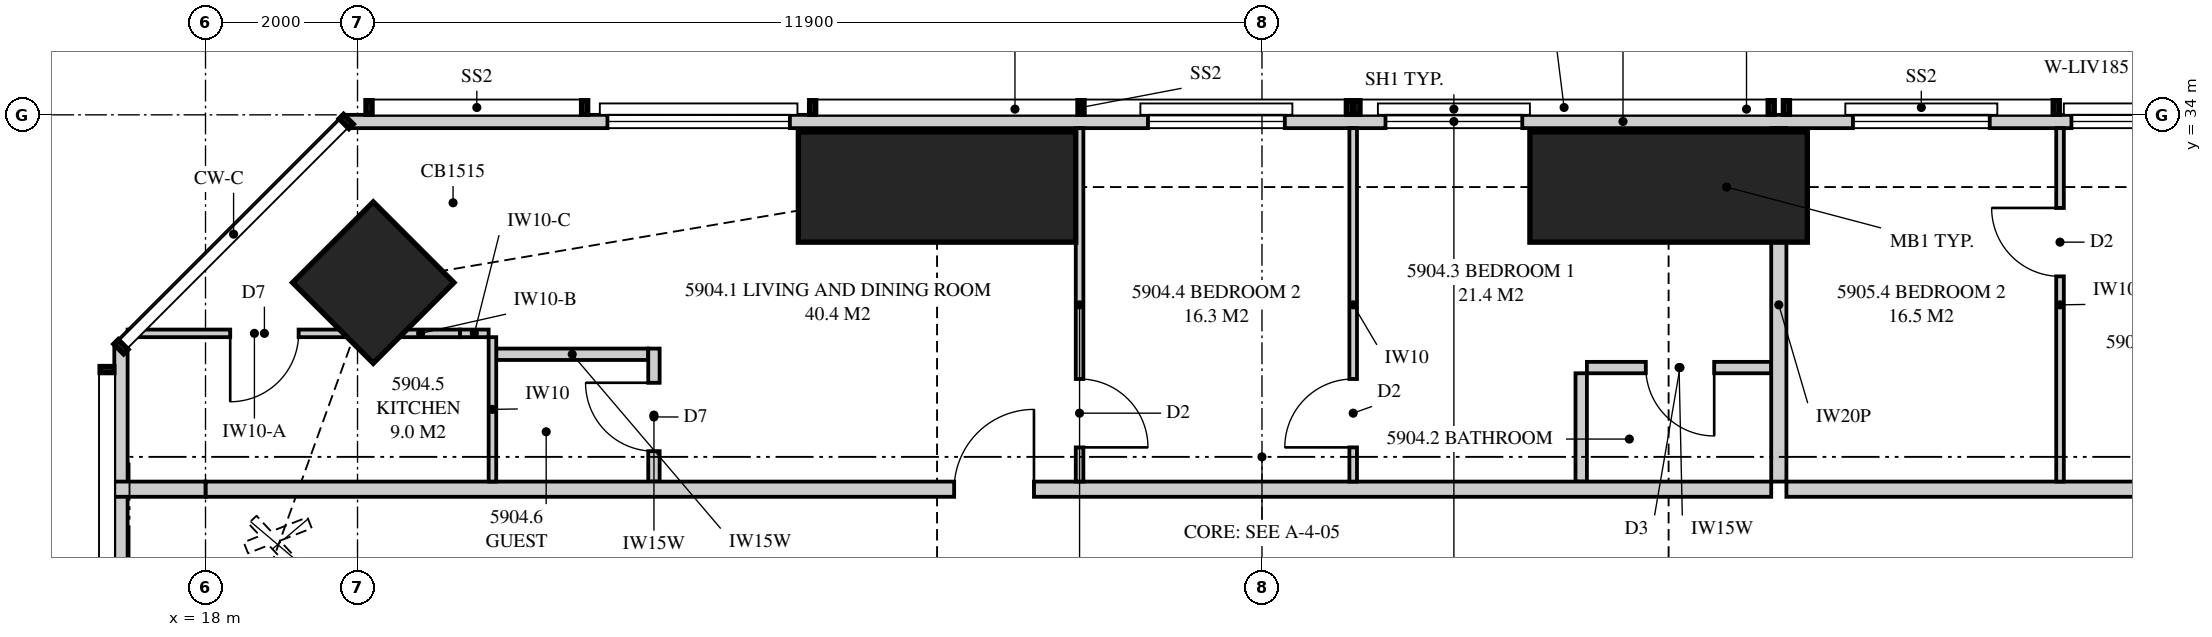
"""IFC4 building model, lengths in metres.
Left out: names, types, materials, properties, quantities, classifications, styles, units other than length and angle.
Written with IfcOpenShell. Run it as: python <this file> out.ifc"""

import sys

from ifc_helpers import new_model, si_unit, direction, frame, frame_2d, origin, origin_2d, place, context, subcontext, project, spatial, polyline, rectangle, hollow_rectangle, outline, extrude, element, fill, save


model = new_model("IFC4")
c1 = context("Model", 3, precision=1e-05, world=origin(), true_north=direction((0.0, 1.0)))
c2 = subcontext(c1, "Body", "Model", "MODEL_VIEW")
j1 = project(units=[si_unit("LENGTHUNIT", "METRE"), si_unit("PLANEANGLEUNIT", "RADIAN")], contexts=[c1])
p1 = place(None, origin())
s1 = spatial("IfcSite", under=j1, at=p1, CompositionType="ELEMENT")
p2 = place(p1, origin())
s2 = spatial("IfcBuilding", under=s1, at=p2, CompositionType="ELEMENT")
p3 = place(p2, frame((0.0, 0.0, 217.95)))
s3 = spatial("IfcBuildingStorey", under=s2, at=p3, CompositionType="ELEMENT", Elevation=217.95)
for number, where, z_axis, x_axis in (
    (1, (37.25, 33.05, 0.0), (0.0, 0.0, 1.0), (0.0, 1.0, 0.0)),
    (2, (27.625, 33.05, 0.0), (0.0, 0.0, 1.0), (0.0, 1.0, 0.0)),
):
    element("IfcColumn", number, at=place(p3, frame(where, z_axis=z_axis, x_axis=x_axis)), inside=s3, PredefinedType="COLUMN", context=c2, shape_type="SweptSolid", body=[
        extrude(rectangle(XDim=1.45, YDim=3.65, at=origin_2d()), origin(), (0.0, 0.0, 1.0), 3.5),
    ])
p4 = place(p3, frame((20.207, 31.793, 0.0), z_axis=(0.0, 0.0, 1.0), x_axis=(0.707106781187, -0.707106781187, 0.0)))
e3 = element("IfcColumn", 3, at=p4, inside=s3, PredefinedType="COLUMN", context=c2, shape_type="SweptSolid", body=[
    extrude(hollow_rectangle(XDim=1.5, YDim=1.5, WallThickness=0.125, at=origin_2d()), origin(), (0.0, 0.0, 1.0), 3.5),
])
p5 = place(p3, frame((53.449, 33.913, 0.0), z_axis=(0.0, 0.0, 1.0), x_axis=(-1.0, 0.0, 0.0)))
e4 = element("IfcWall", 4, at=p5, inside=s3, PredefinedType="SOLIDWALL", context=c2, shape_type="SweptSolid", body=[
    extrude(outline(polyline([(33.597, 0.0), (33.597, 3.26), (26.039, 3.26), (26.039, 2.3), (25.955, 2.3), (25.955, 3.26), (25.824, 3.26), (25.824, 2.3), (6.574, 2.3), (6.574, 3.26), (6.442, 3.26), (6.442, 2.3), (6.359, 2.3), (6.359, 3.26), (0.0, 3.26), (0.0, 0.0), (6.558, 0.0), (6.558, 0.159), (6.838, 0.302), (6.911, 0.302), (7.065, 0.0), (16.226, 0.0), (16.226, 0.178), (16.498, 0.331), (16.553, 0.331), (16.738, 0.0), (25.889, 0.0), (25.889, 0.201), (26.146, 0.358), (26.189, 0.358), (26.408, 0.0), (33.597, 0.0)])), frame((0.0, 0.087, 0.0), z_axis=(0.0, -1.0, 0.0), x_axis=(1.0, 0.0, 0.0)), (0.0, 0.0, 1.0), 0.175),
])
p6 = place(p5, frame((0.6, 0.0, 0.0)))
e5 = element("IfcOpeningElement", 5, at=p6, cuts=e4, PredefinedType="OPENING", context=c2, shape_type="SweptSolid", body=[
    extrude(rectangle(XDim=1.8, YDim=2.25, at=frame_2d((0.9, 1.125))), frame((0.0, 0.097, 0.0), z_axis=(0.0, -1.0, 0.0), x_axis=(1.0, 0.0, 0.0)), (0.0, 0.0, 1.0), 0.195),
])
p7 = place(p5, frame((8.499, 0.0, 0.4)))
e6 = element("IfcOpeningElement", 6, at=p7, cuts=e4, PredefinedType="OPENING", context=c2, shape_type="SweptSolid", body=[
    extrude(rectangle(XDim=2.4, YDim=1.85, at=frame_2d((1.2, 0.925))), frame((0.0, 0.097, 0.0), z_axis=(0.0, -1.0, 0.0), x_axis=(1.0, 0.0, 0.0)), (0.0, 0.0, 1.0), 0.195),
])
p8 = place(p5, frame((11.974, 0.0, 0.4)))
e7 = element("IfcOpeningElement", 7, at=p8, cuts=e4, PredefinedType="OPENING", context=c2, shape_type="SweptSolid", body=[
    extrude(rectangle(XDim=1.8, YDim=1.85, at=frame_2d((0.9, 0.925))), frame((0.0, 0.097, 0.0), z_axis=(0.0, -1.0, 0.0), x_axis=(1.0, 0.0, 0.0)), (0.0, 0.0, 1.0), 0.195),
])
p9 = place(p5, frame((18.124, 0.0, 0.4)))
e8 = element("IfcOpeningElement", 8, at=p9, cuts=e4, PredefinedType="OPENING", context=c2, shape_type="SweptSolid", body=[
    extrude(rectangle(XDim=1.8, YDim=1.85, at=frame_2d((0.9, 0.925))), frame((0.0, 0.097, 0.0), z_axis=(0.0, -1.0, 0.0), x_axis=(1.0, 0.0, 0.0)), (0.0, 0.0, 1.0), 0.195),
])
p10 = place(p5, frame((21.249, 0.0, 0.4)))
e9 = element("IfcOpeningElement", 9, at=p10, cuts=e4, PredefinedType="OPENING", context=c2, shape_type="SweptSolid", body=[
    extrude(rectangle(XDim=1.8, YDim=1.85, at=frame_2d((0.9, 0.925))), frame((0.0, 0.097, 0.0), z_axis=(0.0, -1.0, 0.0), x_axis=(1.0, 0.0, 0.0)), (0.0, 0.0, 1.0), 0.195),
])
p11 = place(p5, frame((27.76, 0.0, 0.4)))
e10 = element("IfcOpeningElement", 10, at=p11, cuts=e4, PredefinedType="OPENING", context=c2, shape_type="SweptSolid", body=[
    extrude(rectangle(XDim=2.4, YDim=1.85, at=frame_2d((1.2, 0.925))), frame((0.0, 0.097, 0.0), z_axis=(0.0, -1.0, 0.0), x_axis=(1.0, 0.0, 0.0)), (0.0, 0.0, 1.0), 0.195),
])
p12 = place(p3, frame((16.887, 30.949, 0.0), z_axis=(0.0, 0.0, 1.0), x_axis=(0.0, -1.0, 0.0)))
e11 = element("IfcWall", 11, at=p12, inside=s3, PredefinedType="SOLIDWALL", context=c2, shape_type="SweptSolid", body=[
    extrude(outline(polyline([(27.897, 0.0), (27.897, 3.26), (18.148, 3.26), (18.148, 2.3), (18.125, 2.3), (18.125, 3.26), (17.949, 3.26), (17.949, 2.3), (5.949, 2.3), (5.949, 3.26), (0.0, 3.26), (0.0, 0.0), (5.239, 0.0), (5.239, 0.013), (6.659, 0.013), (6.659, 0.0), (17.239, 0.0), (17.239, 0.013), (18.659, 0.013), (18.659, 0.0), (27.897, 0.0)])), frame((0.0, 0.087, 0.0), z_axis=(0.0, -1.0, 0.0), x_axis=(1.0, 0.0, 0.0)), (0.0, 0.0, 1.0), 0.175),
])
p13 = place(p12, frame((11.849, 0.0, 0.4)))
e12 = element("IfcOpeningElement", 12, at=p13, cuts=e11, PredefinedType="OPENING", context=c2, shape_type="SweptSolid", body=[
    extrude(rectangle(XDim=1.2, YDim=1.85, at=frame_2d((0.6, 0.925))), frame((0.0, 0.097, 0.0), z_axis=(0.0, -1.0, 0.0), x_axis=(1.0, 0.0, 0.0)), (0.0, 0.0, 1.0), 0.195),
])
p14 = place(p12, frame((23.999, 0.0, 0.4)))
e13 = element("IfcOpeningElement", 13, at=p14, cuts=e11, PredefinedType="OPENING", context=c2, shape_type="SweptSolid", body=[
    extrude(rectangle(XDim=1.2, YDim=1.85, at=frame_2d((0.6, 0.925))), frame((0.0, 0.097, 0.0), z_axis=(0.0, -1.0, 0.0), x_axis=(1.0, 0.0, 0.0)), (0.0, 0.0, 1.0), 0.195),
])
p15 = place(p3, frame((38.7, 33.825, 0.0), z_axis=(0.0, 0.0, 1.0), x_axis=(0.0, -1.0, 0.0)))
e14 = element("IfcWall", 14, at=p15, inside=s3, PredefinedType="PARTITIONING", context=c2, shape_type="SweptSolid", body=[
    extrude(outline(polyline([(0.0, 0.0), (4.65, 0.0), (4.65, 3.26), (1.685, 3.26), (1.685, 2.3), (1.021, 2.3), (1.021, 2.229), (0.529, 2.229), (0.529, 2.3), (0.0, 2.3), (0.0, 0.0)])), frame((0.0, 0.1, 0.0), z_axis=(0.0, -1.0, 0.0), x_axis=(1.0, 0.0, 0.0)), (0.0, 0.0, 1.0), 0.2),
])
p16 = place(p3, frame((18.0, 29.075, 0.0), z_axis=(0.0, 0.0, 1.0), x_axis=(1.0, 0.0, 0.0)))
e15 = element("IfcWall", 15, at=p16, inside=s3, PredefinedType="PARTITIONING", context=c2, shape_type="SweptSolid", body=[
    extrude(outline(polyline([(0.0, 0.0), (20.6, 0.0), (20.6, 3.26), (20.56, 3.26), (20.56, 2.66), (17.94, 2.66), (17.94, 3.26), (10.935, 3.26), (10.935, 2.66), (8.315, 2.66), (8.315, 3.26), (2.192, 3.26), (2.192, 2.3), (0.256, 2.3), (0.256, 3.26), (0.0, 3.26), (0.0, 0.0)])), frame((0.0, 0.1, 0.0), z_axis=(0.0, -1.0, 0.0), x_axis=(1.0, 0.0, 0.0)), (0.0, 0.0, 1.0), 0.2),
])
p17 = place(p16, frame((9.85, 0.0, 0.0)))
e16 = element("IfcOpeningElement", 16, at=p17, cuts=e15, PredefinedType="OPENING", context=c2, shape_type="SweptSolid", body=[
    extrude(rectangle(XDim=1.05, YDim=2.2, at=frame_2d((0.525, 1.1))), frame((0.0, 0.11, 0.0), z_axis=(0.0, -1.0, 0.0), x_axis=(1.0, 0.0, 0.0)), (0.0, 0.0, 1.0), 0.22),
])
p18 = place(p3, frame((36.175, 30.675, 0.0), z_axis=(0.0, 0.0, 1.0), x_axis=(1.0, 0.0, 0.0)))
e17 = element("IfcWall", 17, at=p18, inside=s3, PredefinedType="PLUMBINGWALL", context=c2, shape_type="SweptSolid", body=[
    extrude(outline(polyline([(0.0, 0.0), (2.425, 0.0), (2.425, 3.26), (2.36, 3.26), (2.36, 2.66), (0.0, 2.66), (0.0, 3.26), (0.0, 0.0)])), frame((0.0, 0.075, 0.0), z_axis=(0.0, -1.0, 0.0), x_axis=(1.0, 0.0, 0.0)), (0.0, 0.0, 1.0), 0.15),
])
p19 = place(p18, frame((0.775, 0.0, 0.0)))
e18 = element("IfcOpeningElement", 18, at=p19, cuts=e17, PredefinedType="OPENING", context=c2, shape_type="SweptSolid", body=[
    extrude(rectangle(XDim=0.9, YDim=2.1, at=frame_2d((0.45, 1.05))), frame((0.0, 0.085, 0.0), z_axis=(0.0, -1.0, 0.0), x_axis=(1.0, 0.0, 0.0)), (0.0, 0.0, 1.0), 0.17),
])
p20 = place(p3, frame((36.1, 30.6, 0.0), z_axis=(0.0, 0.0, 1.0), x_axis=(0.0, -1.0, 0.0)))
e19 = element("IfcWall", 19, at=p20, inside=s3, PredefinedType="PLUMBINGWALL", context=c2, shape_type="SweptSolid", body=[
    extrude(outline(polyline([(0.0, 0.0), (1.425, 0.0), (1.425, 3.26), (1.425, 2.66), (0.0, 2.66), (0.0, 3.26), (0.0, 0.0)])), frame((0.0, 0.075, 0.0), z_axis=(0.0, -1.0, 0.0), x_axis=(1.0, 0.0, 0.0)), (0.0, 0.0, 1.0), 0.15),
])
p21 = place(p3, frame((33.1, 33.825, 0.0), z_axis=(0.0, 0.0, 1.0), x_axis=(0.0, -1.0, 0.0)))
e20 = element("IfcWall", 20, at=p21, inside=s3, PredefinedType="PARTITIONING", context=c2, shape_type="SweptSolid", body=[
    extrude(outline(polyline([(0.0, 0.0), (4.65, 0.0), (4.65, 3.26), (1.635, 3.26), (1.635, 2.3), (0.0, 2.3), (0.0, 3.26), (0.0, 0.0)])), frame((0.0, 0.05, 0.0), z_axis=(0.0, -1.0, 0.0), x_axis=(1.0, 0.0, 0.0)), (0.0, 0.0, 1.0), 0.1),
])
p22 = place(p21, frame((3.3, 0.0, 0.0)))
e21 = element("IfcOpeningElement", 21, at=p22, cuts=e20, PredefinedType="OPENING", context=c2, shape_type="SweptSolid", body=[
    extrude(rectangle(XDim=0.9, YDim=2.1, at=frame_2d((0.45, 1.05))), frame((0.0, 0.06, 0.0), z_axis=(0.0, -1.0, 0.0), x_axis=(1.0, 0.0, 0.0)), (0.0, 0.0, 1.0), 0.12),
])
p23 = place(p3, frame((29.5, 33.825, 0.0), z_axis=(0.0, 0.0, 1.0), x_axis=(0.0, -1.0, 0.0)))
e22 = element("IfcWall", 22, at=p23, inside=s3, PredefinedType="PARTITIONING", context=c2, shape_type="SweptSolid", body=[
    extrude(outline(polyline([(0.0, 0.0), (4.65, 0.0), (4.65, 3.26), (1.635, 3.26), (1.635, 2.3), (0.0, 2.3), (0.0, 3.26), (0.0, 0.0)])), frame((0.0, 0.05, 0.0), z_axis=(0.0, -1.0, 0.0), x_axis=(1.0, 0.0, 0.0)), (0.0, 0.0, 1.0), 0.1),
])
p24 = place(p23, frame((3.3, 0.0, 0.0)))
e23 = element("IfcOpeningElement", 23, at=p24, cuts=e22, PredefinedType="OPENING", context=c2, shape_type="SweptSolid", body=[
    extrude(rectangle(XDim=0.9, YDim=2.1, at=frame_2d((0.45, 1.05))), frame((0.0, 0.06, 0.0), z_axis=(0.0, -1.0, 0.0), x_axis=(1.0, 0.0, 0.0)), (0.0, 0.0, 1.0), 0.12),
])
p25 = place(p3, frame((16.975, 31.125, 0.0), z_axis=(0.0, 0.0, 1.0), x_axis=(1.0, 0.0, 0.0)))
e24 = element("IfcWall", 24, at=p25, inside=s3, PredefinedType="PARTITIONING", context=c2, shape_type="SweptSolid", body=[
    extrude(outline(polyline([(2.076, 2.3), (2.076, 3.26), (0.0, 3.26), (0.0, 0.0), (2.664, 0.0), (2.995, 0.829), (3.337, 0.628), (3.337, 2.3), (2.076, 2.3)])), frame((0.0, 0.05, 0.0), z_axis=(0.0, -1.0, 0.0), x_axis=(1.0, 0.0, 0.0)), (0.0, 0.0, 1.0), 0.1),
])
p26 = place(p25, frame((1.35, 0.0, 0.0)))
e25 = element("IfcOpeningElement", 25, at=p26, cuts=e24, PredefinedType="OPENING", context=c2, shape_type="SweptSolid", body=[
    extrude(rectangle(XDim=0.9, YDim=2.1, at=frame_2d((0.45, 1.05))), frame((0.0, 0.06, 0.0), z_axis=(0.0, -1.0, 0.0), x_axis=(1.0, 0.0, 0.0)), (0.0, 0.0, 1.0), 0.12),
])
p27 = place(p3, frame((20.312, 31.125, 0.0), z_axis=(0.0, 0.0, 1.0), x_axis=(1.0, 0.0, 0.0)))
e26 = element("IfcWall", 26, at=p27, inside=s3, PredefinedType="PARTITIONING", context=c2, shape_type="SweptSolid", body=[
    extrude(outline(polyline([(0.739, 0.196), (0.739, 0.0), (1.037, 0.0), (1.037, 2.3), (0.0, 2.3), (0.0, 0.628), (0.739, 0.196)])), frame((0.0, 0.05, 0.0), z_axis=(0.0, -1.0, 0.0), x_axis=(1.0, 0.0, 0.0)), (0.0, 0.0, 1.0), 0.1),
])
p28 = place(p3, frame((21.349, 31.125, 0.0), z_axis=(0.0, 0.0, 1.0), x_axis=(1.0, 0.0, 0.0)))
e27 = element("IfcWall", 27, at=p28, inside=s3, PredefinedType="PARTITIONING", context=c2, shape_type="SweptSolid", body=[
    extrude(outline(polyline([(0.0, 0.0), (0.376, 0.0), (0.376, 3.26), (0.064, 3.26), (0.064, 2.3), (0.0, 2.3), (0.0, 0.0)])), frame((0.0, 0.05, 0.0), z_axis=(0.0, -1.0, 0.0), x_axis=(1.0, 0.0, 0.0)), (0.0, 0.0, 1.0), 0.1),
])
p29 = place(p3, frame((21.775, 31.075, 0.0), z_axis=(0.0, 0.0, 1.0), x_axis=(0.0, -1.0, 0.0)))
e28 = element("IfcWall", 28, at=p29, inside=s3, PredefinedType="PARTITIONING", context=c2, shape_type="SweptSolid", body=[
    extrude(rectangle(XDim=1.9, YDim=0.1, at=frame_2d((0.95, 0.0))), origin(), (0.0, 0.0, 1.0), 3.26),
])
p30 = place(p3, frame((38.8, 29.075, 0.0), z_axis=(0.0, 0.0, 1.0), x_axis=(1.0, 0.0, 0.0)))
e29 = element("IfcWall", 29, at=p30, inside=s3, PredefinedType="PARTITIONING", context=c2, shape_type="SweptSolid", body=[
    extrude(outline(polyline([(0.0, 0.0), (7.075, 0.0), (7.075, 3.26), (7.075, 2.66), (6.765, 2.66), (6.765, 3.26), (0.0, 3.26), (0.0, 0.0)])), frame((0.0, 0.1, 0.0), z_axis=(0.0, -1.0, 0.0), x_axis=(1.0, 0.0, 0.0)), (0.0, 0.0, 1.0), 0.2),
])
p31 = place(p30, frame((5.875, 0.0, 0.0)))
e30 = element("IfcOpeningElement", 30, at=p31, cuts=e29, PredefinedType="OPENING", context=c2, shape_type="SweptSolid", body=[
    extrude(rectangle(XDim=1.05, YDim=2.2, at=frame_2d((0.525, 1.1))), frame((0.0, 0.11, 0.0), z_axis=(0.0, -1.0, 0.0), x_axis=(1.0, 0.0, 0.0)), (0.0, 0.0, 1.0), 0.22),
])
p32 = place(p3, frame((42.4, 33.825, 0.0), z_axis=(0.0, 0.0, 1.0), x_axis=(0.0, -1.0, 0.0)))
e31 = element("IfcWall", 31, at=p32, inside=s3, PredefinedType="PARTITIONING", context=c2, shape_type="SweptSolid", body=[
    extrude(outline(polyline([(0.0, 0.0), (4.65, 0.0), (4.65, 3.26), (1.635, 3.26), (1.635, 2.3), (0.0, 2.3), (0.0, 3.26), (0.0, 0.0)])), frame((0.0, 0.05, 0.0), z_axis=(0.0, -1.0, 0.0), x_axis=(1.0, 0.0, 0.0)), (0.0, 0.0, 1.0), 0.1),
])
p33 = place(p32, frame((1.05, 0.0, 0.0)))
e32 = element("IfcOpeningElement", 32, at=p33, cuts=e31, PredefinedType="OPENING", context=c2, shape_type="SweptSolid", body=[
    extrude(rectangle(XDim=0.9, YDim=2.1, at=frame_2d((0.45, 1.05))), frame((0.0, 0.06, 0.0), z_axis=(0.0, -1.0, 0.0), x_axis=(1.0, 0.0, 0.0)), (0.0, 0.0, 1.0), 0.12),
])
p34 = place(p3, frame((16.8, 29.075, 0.0), z_axis=(0.0, 0.0, 1.0), x_axis=(1.0, 0.0, 0.0)))
e33 = element("IfcWall", 33, at=p34, inside=s3, PredefinedType="PARTITIONING", context=c2, shape_type="SweptSolid", body=[
    extrude(rectangle(XDim=1.2, YDim=0.2, at=frame_2d((0.6, 0.0))), origin(), (0.0, 0.0, 1.0), 3.26),
])
p35 = place(p3, frame((23.9, 29.175, 0.0), z_axis=(0.0, 0.0, 1.0), x_axis=(0.0, 1.0, 0.0)))
e34 = element("IfcWall", 34, at=p35, inside=s3, PredefinedType="PLUMBINGWALL", context=c2, shape_type="SweptSolid", body=[
    extrude(rectangle(XDim=1.75, YDim=0.15, at=frame_2d((0.875, 0.0))), origin(), (0.0, 0.0, 1.0), 3.26),
])
p36 = place(p35, frame((0.4, 0.0, 0.0)))
e35 = element("IfcOpeningElement", 35, at=p36, cuts=e34, PredefinedType="OPENING", context=c2, shape_type="SweptSolid", body=[
    extrude(rectangle(XDim=0.9, YDim=2.1, at=frame_2d((0.45, 1.05))), frame((0.0, 0.085, 0.0), z_axis=(0.0, -1.0, 0.0), x_axis=(1.0, 0.0, 0.0)), (0.0, 0.0, 1.0), 0.17),
])
p37 = place(p3, frame((21.825, 30.85, 0.0), z_axis=(0.0, 0.0, 1.0), x_axis=(1.0, 0.0, 0.0)))
e36 = element("IfcWall", 36, at=p37, inside=s3, PredefinedType="PLUMBINGWALL", context=c2, shape_type="SweptSolid", body=[
    extrude(rectangle(XDim=2.0, YDim=0.15, at=frame_2d((1.0, 0.0))), origin(), (0.0, 0.0, 1.0), 3.26),
])
p38 = place(p7, origin())
e37 = element("IfcWindow", 37, at=p38, inside=s3, PartitioningType="SINGLE_PANEL", PredefinedType="WINDOW", context=c2, shape_type="SweptSolid", body=[
    extrude(rectangle(XDim=2.4, YDim=1.85, at=frame_2d((1.2, 0.925))), frame((0.0, 0.03, 0.0), z_axis=(0.0, -1.0, 0.0), x_axis=(1.0, 0.0, 0.0)), (0.0, 0.0, 1.0), 0.06),
])
fill(e6, e37)
p39 = place(p8, origin())
e38 = element("IfcWindow", 38, at=p39, inside=s3, PartitioningType="SINGLE_PANEL", PredefinedType="WINDOW", context=c2, shape_type="SweptSolid", body=[
    extrude(rectangle(XDim=1.8, YDim=1.85, at=frame_2d((0.9, 0.925))), frame((0.0, 0.03, 0.0), z_axis=(0.0, -1.0, 0.0), x_axis=(1.0, 0.0, 0.0)), (0.0, 0.0, 1.0), 0.06),
])
fill(e7, e38)
p40 = place(p9, origin())
e39 = element("IfcWindow", 39, at=p40, inside=s3, PartitioningType="SINGLE_PANEL", PredefinedType="WINDOW", context=c2, shape_type="SweptSolid", body=[
    extrude(rectangle(XDim=1.8, YDim=1.85, at=frame_2d((0.9, 0.925))), frame((0.0, 0.03, 0.0), z_axis=(0.0, -1.0, 0.0), x_axis=(1.0, 0.0, 0.0)), (0.0, 0.0, 1.0), 0.06),
])
fill(e8, e39)
p41 = place(p10, origin())
e40 = element("IfcWindow", 40, at=p41, inside=s3, PartitioningType="SINGLE_PANEL", PredefinedType="WINDOW", context=c2, shape_type="SweptSolid", body=[
    extrude(rectangle(XDim=1.8, YDim=1.85, at=frame_2d((0.9, 0.925))), frame((0.0, 0.03, 0.0), z_axis=(0.0, -1.0, 0.0), x_axis=(1.0, 0.0, 0.0)), (0.0, 0.0, 1.0), 0.06),
])
fill(e9, e40)
p42 = place(p11, origin())
e41 = element("IfcWindow", 41, at=p42, inside=s3, PartitioningType="SINGLE_PANEL", PredefinedType="WINDOW", context=c2, shape_type="SweptSolid", body=[
    extrude(rectangle(XDim=2.4, YDim=1.85, at=frame_2d((1.2, 0.925))), frame((0.0, 0.03, 0.0), z_axis=(0.0, -1.0, 0.0), x_axis=(1.0, 0.0, 0.0)), (0.0, 0.0, 1.0), 0.06),
])
fill(e10, e41)
p43 = place(p17, origin())
e42 = element("IfcDoor", 42, at=p43, inside=s3, OperationType="SINGLE_SWING_RIGHT", PredefinedType="DOOR", context=c2, shape_type="SweptSolid", body=[
    extrude(rectangle(XDim=1.05, YDim=2.2, at=frame_2d((0.525, 1.1))), frame((0.0, 0.025, 0.0), z_axis=(0.0, -1.0, 0.0), x_axis=(1.0, 0.0, 0.0)), (0.0, 0.0, 1.0), 0.05),
])
fill(e16, e42)
p44 = place(p19, frame((0.9, 0.0, 0.0), z_axis=(0.0, 0.0, 1.0), x_axis=(-1.0, 0.0, 0.0)))
e43 = element("IfcDoor", 43, at=p44, inside=s3, OperationType="SINGLE_SWING_LEFT", PredefinedType="DOOR", context=c2, shape_type="SweptSolid", body=[
    extrude(rectangle(XDim=0.9, YDim=2.1, at=frame_2d((0.45, 1.05))), frame((0.0, 0.025, 0.0), z_axis=(0.0, -1.0, 0.0), x_axis=(1.0, 0.0, 0.0)), (0.0, 0.0, 1.0), 0.05),
])
fill(e18, e43)
p45 = place(p22, frame((0.9, 0.0, 0.0), z_axis=(0.0, 0.0, 1.0), x_axis=(-1.0, 0.0, 0.0)))
e44 = element("IfcDoor", 44, at=p45, inside=s3, OperationType="SINGLE_SWING_LEFT", PredefinedType="DOOR", context=c2, shape_type="SweptSolid", body=[
    extrude(rectangle(XDim=0.9, YDim=2.1, at=frame_2d((0.45, 1.05))), frame((0.0, 0.025, 0.0), z_axis=(0.0, -1.0, 0.0), x_axis=(1.0, 0.0, 0.0)), (0.0, 0.0, 1.0), 0.05),
])
fill(e21, e44)
p46 = place(p24, origin())
e45 = element("IfcDoor", 45, at=p46, inside=s3, OperationType="SINGLE_SWING_RIGHT", PredefinedType="DOOR", context=c2, shape_type="SweptSolid", body=[
    extrude(rectangle(XDim=0.9, YDim=2.1, at=frame_2d((0.45, 1.05))), frame((0.0, 0.025, 0.0), z_axis=(0.0, -1.0, 0.0), x_axis=(1.0, 0.0, 0.0)), (0.0, 0.0, 1.0), 0.05),
])
fill(e23, e45)
p47 = place(p26, frame((0.9, 0.0, 0.0), z_axis=(0.0, 0.0, 1.0), x_axis=(-1.0, 0.0, 0.0)))
e46 = element("IfcDoor", 46, at=p47, inside=s3, OperationType="SINGLE_SWING_RIGHT", PredefinedType="DOOR", context=c2, shape_type="SweptSolid", body=[
    extrude(rectangle(XDim=0.9, YDim=2.1, at=frame_2d((0.45, 1.05))), frame((0.0, 0.025, 0.0), z_axis=(0.0, -1.0, 0.0), x_axis=(1.0, 0.0, 0.0)), (0.0, 0.0, 1.0), 0.05),
])
fill(e25, e46)
p48 = place(p33, frame((0.9, 0.0, 0.0), z_axis=(0.0, 0.0, 1.0), x_axis=(-1.0, 0.0, 0.0)))
e47 = element("IfcDoor", 47, at=p48, inside=s3, OperationType="SINGLE_SWING_RIGHT", PredefinedType="DOOR", context=c2, shape_type="SweptSolid", body=[
    extrude(rectangle(XDim=0.9, YDim=2.1, at=frame_2d((0.45, 1.05))), frame((0.0, 0.025, 0.0), z_axis=(0.0, -1.0, 0.0), x_axis=(1.0, 0.0, 0.0)), (0.0, 0.0, 1.0), 0.05),
])
fill(e32, e47)
p49 = place(p36, origin())
e48 = element("IfcDoor", 48, at=p49, inside=s3, OperationType="SINGLE_SWING_RIGHT", PredefinedType="DOOR", context=c2, shape_type="SweptSolid", body=[
    extrude(rectangle(XDim=0.9, YDim=2.1, at=frame_2d((0.45, 1.05))), frame((0.0, 0.025, 0.0), z_axis=(0.0, -1.0, 0.0), x_axis=(1.0, 0.0, 0.0)), (0.0, 0.0, 1.0), 0.05),
])
fill(e35, e48)
save(model, sys.argv[1])
